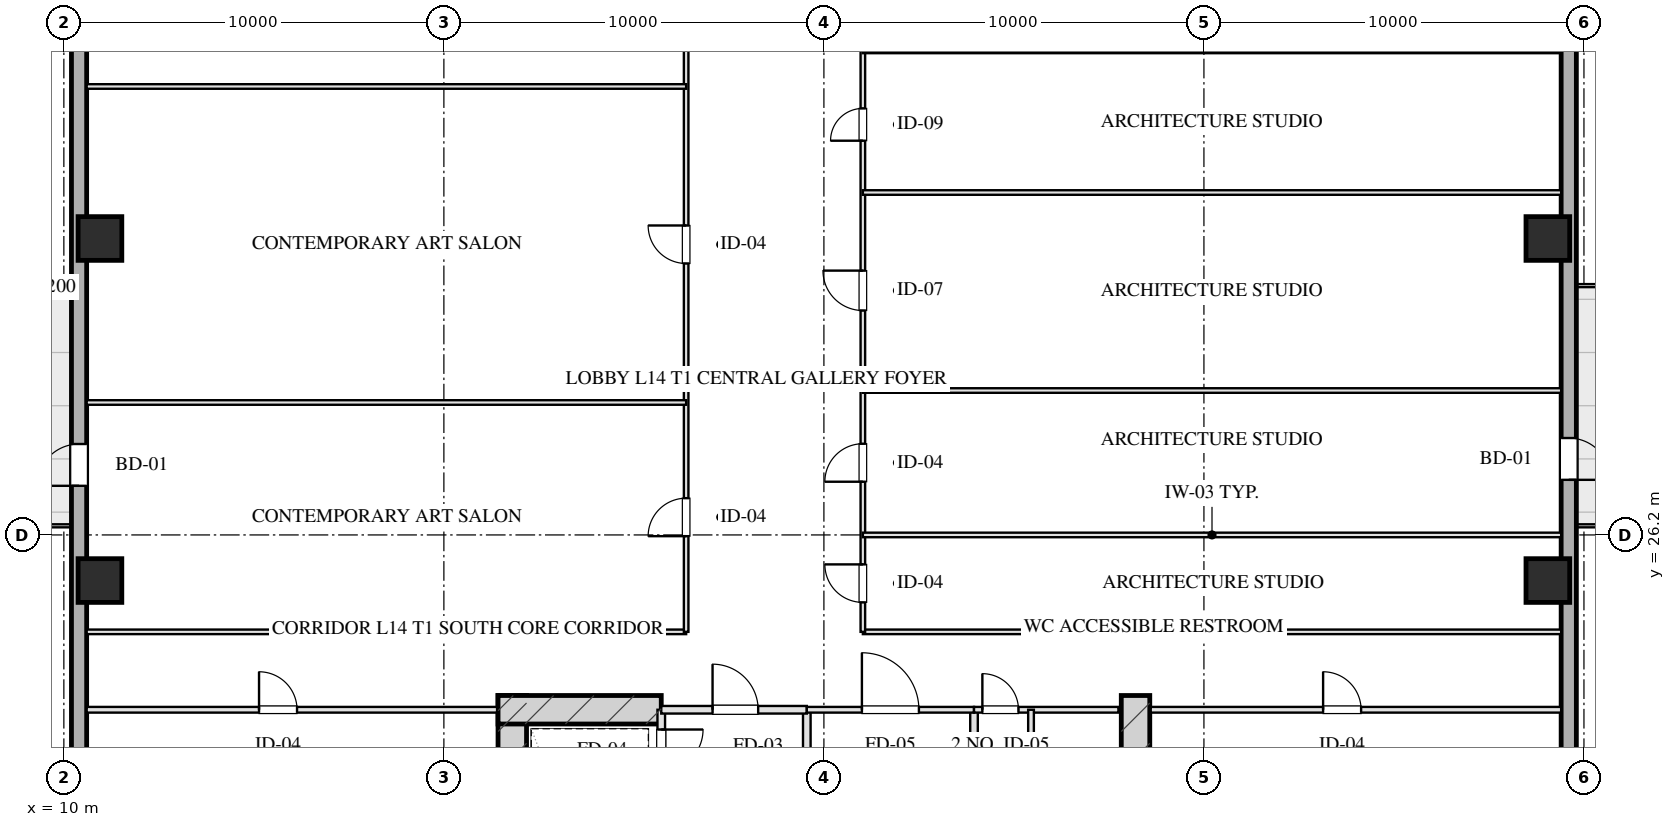
"""IFC4 building model, lengths in metres.
Left out: names, types, materials, properties, quantities, classifications, styles, units other than length and angle.
Written with IfcOpenShell. Run it as: python <this file> out.ifc"""

import sys

from ifc_helpers import new_model, si_unit, direction, frame, frame_2d, origin, origin_2d, place, context, subcontext, project, spatial, rectangle, hollow_rectangle, extrude, element, fill, save


model = new_model("IFC4")
c1 = context("Model", 3, precision=1e-05, world=origin(), true_north=direction((0.0, 1.0)))
c2 = subcontext(c1, "Body", "Model", "MODEL_VIEW")
j1 = project(units=[si_unit("LENGTHUNIT", "METRE"), si_unit("PLANEANGLEUNIT", "RADIAN")], contexts=[c1])
p1 = place(None, origin())
s1 = spatial("IfcSite", under=j1, at=p1, CompositionType="ELEMENT")
p2 = place(p1, origin())
s2 = spatial("IfcBuilding", under=s1, at=p2, CompositionType="ELEMENT")
p3 = place(p2, frame((0.0, 0.0, 60.95)))
s3 = spatial("IfcBuildingStorey", under=s2, at=p3, CompositionType="ELEMENT", Elevation=60.95)
for number, where, z_axis, x_axis in (
    (1, (21.8, 21.975, 0.0), (0.0, 0.0, 1.0), (0.0, -1.0, 0.0)),
    (2, (38.2, 21.975, 0.0), (0.0, 0.0, 1.0), (0.0, -1.0, 0.0)),
):
    element("IfcWall", number, at=place(p3, frame(where, z_axis=z_axis, x_axis=x_axis)), inside=s3, PredefinedType="SHEAR", context=c2, shape_type="SweptSolid", body=[
        extrude(rectangle(XDim=9.63, YDim=0.75, at=frame_2d((4.815, 0.0))), origin(), (0.0, 0.0, 1.0), 3.45),
    ])
p4 = place(p3, frame((21.425, 21.6, 0.0), z_axis=(0.0, 0.0, 1.0), x_axis=(1.0, 0.0, 0.0)))
e3 = element("IfcWall", 3, at=p4, inside=s3, PredefinedType="SHEAR", context=c2, shape_type="SweptSolid", body=[
    extrude(rectangle(XDim=4.295, YDim=0.75, at=frame_2d((2.147, 0.0))), origin(), (0.0, 0.0, 1.0), 3.45),
])
for number, where, z_axis, x_axis in (
    (4, (10.95, 25.0, 0.0), (0.0, 0.0, 1.0), (1.0, 0.0, 0.0)),
    (5, (10.95, 34.0, 0.0), (0.0, 0.0, 1.0), (1.0, 0.0, 0.0)),
    (6, (49.05, 25.0, 0.0), (0.0, 0.0, 1.0), (1.0, 0.0, 0.0)),
    (7, (49.05, 34.0, 0.0), (0.0, 0.0, 1.0), (1.0, 0.0, 0.0)),
):
    element("IfcColumn", number, at=place(p3, frame(where, z_axis=z_axis, x_axis=x_axis)), inside=s3, PredefinedType="COLUMN", context=c2, shape_type="SweptSolid", body=[
        extrude(hollow_rectangle(XDim=1.15, YDim=1.15, WallThickness=0.04, at=origin_2d()), origin(), (0.0, 0.0, 1.0), 3.451),
    ])
p5 = place(p3, frame((10.4, 7.2, 0.0), z_axis=(0.0, 0.0, 1.0), x_axis=(0.0, 1.0, 0.0)))
e8 = element("IfcWall", 8, at=p5, inside=s3, PredefinedType="SOLIDWALL", context=c2, shape_type="SweptSolid", body=[
    extrude(rectangle(XDim=53.6, YDim=0.4, at=frame_2d((26.8, 0.0))), origin(), (0.0, 0.0, 1.0), 2.61),
])
p6 = place(p5, frame((31.95, 0.0, 0.75)))
e9 = element("IfcOpeningElement", 9, at=p6, cuts=e8, PredefinedType="OPENING", context=c2, shape_type="SweptSolid", body=[
    extrude(rectangle(XDim=2.5, YDim=1.46, at=frame_2d((1.25, 0.73))), frame((0.0, 0.21, 0.0), z_axis=(0.0, -1.0, 0.0), x_axis=(1.0, 0.0, 0.0)), (0.0, 0.0, 1.0), 0.42),
])
p7 = place(p5, frame((20.292, 0.0, 0.0)))
e10 = element("IfcOpeningElement", 10, at=p7, cuts=e8, PredefinedType="OPENING", context=c2, shape_type="SweptSolid", body=[
    extrude(rectangle(XDim=1.1, YDim=2.15, at=frame_2d((0.55, 1.075))), frame((0.0, 0.21, 0.0), z_axis=(0.0, -1.0, 0.0), x_axis=(1.0, 0.0, 0.0)), (0.0, 0.0, 1.0), 0.42),
])
p8 = place(p3, frame((49.6, 60.8, 0.0), z_axis=(0.0, 0.0, 1.0), x_axis=(0.0, -1.0, 0.0)))
e11 = element("IfcWall", 11, at=p8, inside=s3, PredefinedType="SOLIDWALL", context=c2, shape_type="SweptSolid", body=[
    extrude(rectangle(XDim=53.6, YDim=0.4, at=frame_2d((26.8, 0.0))), origin(), (0.0, 0.0, 1.0), 2.61),
])
p9 = place(p8, frame((32.05, 0.0, 0.0)))
e12 = element("IfcOpeningElement", 12, at=p9, cuts=e11, PredefinedType="OPENING", context=c2, shape_type="SweptSolid", body=[
    extrude(rectangle(XDim=1.1, YDim=2.15, at=frame_2d((0.55, 1.075))), frame((0.0, 0.21, 0.0), z_axis=(0.0, -1.0, 0.0), x_axis=(1.0, 0.0, 0.0)), (0.0, 0.0, 1.0), 0.42),
])
p10 = place(p3, frame((25.72, 21.6, 0.0), z_axis=(0.0, 0.0, 1.0), x_axis=(0.0, -1.0, 0.0)))
e13 = element("IfcWall", 13, at=p10, inside=s3, PredefinedType="PARTITIONING", context=c2, shape_type="SweptSolid", body=[
    extrude(rectangle(XDim=1.9, YDim=0.2, at=frame_2d((0.95, 0.0))), origin(), (0.0, 0.0, 1.0), 3.175),
])
p11 = place(p10, frame((0.52, 0.0, 0.0)))
e14 = element("IfcOpeningElement", 14, at=p11, cuts=e13, PredefinedType="OPENING", context=c2, shape_type="SweptSolid", body=[
    extrude(rectangle(XDim=1.1, YDim=2.05, at=frame_2d((0.55, 1.025))), frame((0.0, 0.11, 0.0), z_axis=(0.0, -1.0, 0.0), x_axis=(1.0, 0.0, 0.0)), (0.0, 0.0, 1.0), 0.22),
])
p12 = place(p3, frame((29.55, 21.6, 0.0), z_axis=(0.0, 0.0, 1.0), x_axis=(0.0, -1.0, 0.0)))
e15 = element("IfcWall", 15, at=p12, inside=s3, PredefinedType="PARTITIONING", context=c2, shape_type="SweptSolid", body=[
    extrude(rectangle(XDim=8.43, YDim=0.2, at=frame_2d((4.215, 0.0))), origin(), (0.0, 0.0, 1.0), 3.175),
])
p13 = place(p3, frame((25.72, 21.6, 0.0), z_axis=(0.0, 0.0, 1.0), x_axis=(1.0, 0.0, 0.0)))
e16 = element("IfcWall", 16, at=p13, inside=s3, PredefinedType="PARTITIONING", context=c2, shape_type="SweptSolid", body=[
    extrude(rectangle(XDim=3.83, YDim=0.2, at=frame_2d((1.915, 0.0))), origin(), (0.0, 0.0, 1.0), 3.175),
])
p14 = place(p13, frame((1.35, 0.0, 0.0)))
e17 = element("IfcOpeningElement", 17, at=p14, cuts=e16, PredefinedType="OPENING", context=c2, shape_type="SweptSolid", body=[
    extrude(rectangle(XDim=1.2, YDim=2.05, at=frame_2d((0.6, 1.025))), frame((0.0, 0.11, 0.0), z_axis=(0.0, -1.0, 0.0), x_axis=(1.0, 0.0, 0.0)), (0.0, 0.0, 1.0), 0.22),
])
p15 = place(p3, frame((33.95, 21.6, 0.0), z_axis=(0.0, 0.0, 1.0), x_axis=(0.0, -1.0, 0.0)))
e18 = element("IfcWall", 18, at=p15, inside=s3, PredefinedType="PARTITIONING", context=c2, shape_type="SweptSolid", body=[
    extrude(rectangle(XDim=8.43, YDim=0.2, at=frame_2d((4.215, 0.0))), origin(), (0.0, 0.0, 1.0), 3.175),
])
p16 = place(p3, frame((29.55, 21.6, 0.0), z_axis=(0.0, 0.0, 1.0), x_axis=(1.0, 0.0, 0.0)))
e19 = element("IfcWall", 19, at=p16, inside=s3, PredefinedType="PARTITIONING", context=c2, shape_type="SweptSolid", body=[
    extrude(rectangle(XDim=4.4, YDim=0.15, at=frame_2d((2.2, 0.0))), origin(), (0.0, 0.0, 1.0), 3.175),
])
p17 = place(p16, frame((1.45, 0.0, 0.0)))
e20 = element("IfcOpeningElement", 20, at=p17, cuts=e19, PredefinedType="OPENING", context=c2, shape_type="SweptSolid", body=[
    extrude(rectangle(XDim=1.5, YDim=2.05, at=frame_2d((0.75, 1.025))), frame((0.0, 0.085, 0.0), z_axis=(0.0, -1.0, 0.0), x_axis=(1.0, 0.0, 0.0)), (0.0, 0.0, 1.0), 0.17),
])
p18 = place(p3, frame((33.95, 21.6, 0.0), z_axis=(0.0, 0.0, 1.0), x_axis=(1.0, 0.0, 0.0)))
e21 = element("IfcWall", 21, at=p18, inside=s3, PredefinedType="PARTITIONING", context=c2, shape_type="SweptSolid", body=[
    extrude(rectangle(XDim=3.8, YDim=0.15, at=frame_2d((1.9, 0.0))), origin(), (0.0, 0.0, 1.0), 3.175),
])
p19 = place(p18, frame((0.22, 0.0, 0.0)))
e22 = element("IfcOpeningElement", 22, at=p19, cuts=e21, PredefinedType="OPENING", context=c2, shape_type="SweptSolid", body=[
    extrude(rectangle(XDim=0.95, YDim=2.05, at=frame_2d((0.475, 1.025))), frame((0.0, 0.085, 0.0), z_axis=(0.0, -1.0, 0.0), x_axis=(1.0, 0.0, 0.0)), (0.0, 0.0, 1.0), 0.17),
])
p20 = place(p3, frame((35.45, 21.6, 0.0), z_axis=(0.0, 0.0, 1.0), x_axis=(0.0, -1.0, 0.0)))
e23 = element("IfcWall", 23, at=p20, inside=s3, PredefinedType="PARTITIONING", context=c2, shape_type="SweptSolid", body=[
    extrude(rectangle(XDim=8.43, YDim=0.15, at=frame_2d((4.215, 0.0))), origin(), (0.0, 0.0, 1.0), 2.765),
])
p21 = place(p20, frame((2.55, 0.0, 0.0)))
e24 = element("IfcOpeningElement", 24, at=p21, cuts=e23, PredefinedType="OPENING", context=c2, shape_type="SweptSolid", body=[
    extrude(rectangle(XDim=0.95, YDim=2.05, at=frame_2d((0.475, 1.025))), frame((0.0, 0.085, 0.0), z_axis=(0.0, -1.0, 0.0), x_axis=(1.0, 0.0, 0.0)), (0.0, 0.0, 1.0), 0.17),
])
p22 = place(p20, frame((5.8, 0.0, 0.0)))
e25 = element("IfcOpeningElement", 25, at=p22, cuts=e23, PredefinedType="OPENING", context=c2, shape_type="SweptSolid", body=[
    extrude(rectangle(XDim=0.9, YDim=2.05, at=frame_2d((0.45, 1.025))), frame((0.0, 0.085, 0.0), z_axis=(0.0, -1.0, 0.0), x_axis=(1.0, 0.0, 0.0)), (0.0, 0.0, 1.0), 0.17),
])
p23 = place(p3, frame((10.6, 21.6, 0.0), z_axis=(0.0, 0.0, 1.0), x_axis=(1.0, 0.0, 0.0)))
e26 = element("IfcWall", 26, at=p23, inside=s3, PredefinedType="PARTITIONING", context=c2, shape_type="SweptSolid", body=[
    extrude(rectangle(XDim=10.8, YDim=0.15, at=frame_2d((5.4, 0.0))), origin(), (0.0, 0.0, 1.0), 3.175),
])
p24 = place(p23, frame((4.536, 0.0, 0.0)))
e27 = element("IfcOpeningElement", 27, at=p24, cuts=e26, PredefinedType="OPENING", context=c2, shape_type="SweptSolid", body=[
    extrude(rectangle(XDim=1.0, YDim=2.05, at=frame_2d((0.5, 1.025))), frame((0.0, 0.085, 0.0), z_axis=(0.0, -1.0, 0.0), x_axis=(1.0, 0.0, 0.0)), (0.0, 0.0, 1.0), 0.17),
])
p25 = place(p3, frame((38.6, 21.6, 0.0), z_axis=(0.0, 0.0, 1.0), x_axis=(1.0, 0.0, 0.0)))
e28 = element("IfcWall", 28, at=p25, inside=s3, PredefinedType="PARTITIONING", context=c2, shape_type="SweptSolid", body=[
    extrude(rectangle(XDim=10.8, YDim=0.15, at=frame_2d((5.4, 0.0))), origin(), (0.0, 0.0, 1.0), 3.175),
])
p26 = place(p25, frame((4.536, 0.0, 0.0)))
e29 = element("IfcOpeningElement", 29, at=p26, cuts=e28, PredefinedType="OPENING", context=c2, shape_type="SweptSolid", body=[
    extrude(rectangle(XDim=1.0, YDim=2.05, at=frame_2d((0.5, 1.025))), frame((0.0, 0.085, 0.0), z_axis=(0.0, -1.0, 0.0), x_axis=(1.0, 0.0, 0.0)), (0.0, 0.0, 1.0), 0.17),
])
p27 = place(p3, frame((10.6, 23.65, 0.0), z_axis=(0.0, 0.0, 1.0), x_axis=(1.0, 0.0, 0.0)))
e30 = element("IfcWall", 30, at=p27, inside=s3, PredefinedType="PARTITIONING", context=c2, shape_type="SweptSolid", body=[
    extrude(rectangle(XDim=15.775, YDim=0.12, at=frame_2d((7.887, 0.0))), origin(), (0.0, 0.0, 1.0), 3.175),
])
p28 = place(p3, frame((31.025, 23.65, 0.0), z_axis=(0.0, 0.0, 1.0), x_axis=(1.0, 0.0, 0.0)))
e31 = element("IfcWall", 31, at=p28, inside=s3, PredefinedType="PARTITIONING", context=c2, shape_type="SweptSolid", body=[
    extrude(rectangle(XDim=18.375, YDim=0.12, at=frame_2d((9.188, 0.0))), origin(), (0.0, 0.0, 1.0), 3.175),
])
p29 = place(p3, frame((26.375, 23.65, 0.0), z_axis=(0.0, 0.0, 1.0), x_axis=(0.0, 1.0, 0.0)))
e32 = element("IfcWall", 32, at=p29, inside=s3, PredefinedType="PARTITIONING", context=c2, shape_type="SweptSolid", body=[
    extrude(rectangle(XDim=20.7, YDim=0.12, at=frame_2d((10.35, 0.0))), origin(), (0.0, 0.0, 1.0), 3.175),
])
p30 = place(p29, frame((2.518, 0.0, 0.0)))
e33 = element("IfcOpeningElement", 33, at=p30, cuts=e32, PredefinedType="OPENING", context=c2, shape_type="SweptSolid", body=[
    extrude(rectangle(XDim=1.0, YDim=2.05, at=frame_2d((0.5, 1.025))), frame((0.0, 0.07, 0.0), z_axis=(0.0, -1.0, 0.0), x_axis=(1.0, 0.0, 0.0)), (0.0, 0.0, 1.0), 0.14),
])
p31 = place(p29, frame((9.692, 0.0, 0.0)))
e34 = element("IfcOpeningElement", 34, at=p31, cuts=e32, PredefinedType="OPENING", context=c2, shape_type="SweptSolid", body=[
    extrude(rectangle(XDim=1.0, YDim=2.05, at=frame_2d((0.5, 1.025))), frame((0.0, 0.07, 0.0), z_axis=(0.0, -1.0, 0.0), x_axis=(1.0, 0.0, 0.0)), (0.0, 0.0, 1.0), 0.14),
])
p32 = place(p29, frame((17.025, 0.0, 0.0)))
e35 = element("IfcOpeningElement", 35, at=p32, cuts=e32, PredefinedType="OPENING", context=c2, shape_type="SweptSolid", body=[
    extrude(rectangle(XDim=1.0, YDim=2.05, at=frame_2d((0.5, 1.025))), frame((0.0, 0.07, 0.0), z_axis=(0.0, -1.0, 0.0), x_axis=(1.0, 0.0, 0.0)), (0.0, 0.0, 1.0), 0.14),
])
p33 = place(p3, frame((31.025, 23.65, 0.0), z_axis=(0.0, 0.0, 1.0), x_axis=(0.0, 1.0, 0.0)))
e36 = element("IfcWall", 36, at=p33, inside=s3, PredefinedType="PARTITIONING", context=c2, shape_type="SweptSolid", body=[
    extrude(rectangle(XDim=20.7, YDim=0.12, at=frame_2d((10.35, 0.0))), origin(), (0.0, 0.0, 1.0), 3.175),
])
p34 = place(p33, frame((0.775, 0.0, 0.0)))
e37 = element("IfcOpeningElement", 37, at=p34, cuts=e36, PredefinedType="OPENING", context=c2, shape_type="SweptSolid", body=[
    extrude(rectangle(XDim=1.0, YDim=2.05, at=frame_2d((0.5, 1.025))), frame((0.0, 0.07, 0.0), z_axis=(0.0, -1.0, 0.0), x_axis=(1.0, 0.0, 0.0)), (0.0, 0.0, 1.0), 0.14),
])
p35 = place(p33, frame((3.95, 0.0, 0.0)))
e38 = element("IfcOpeningElement", 38, at=p35, cuts=e36, PredefinedType="OPENING", context=c2, shape_type="SweptSolid", body=[
    extrude(rectangle(XDim=1.0, YDim=2.05, at=frame_2d((0.5, 1.025))), frame((0.0, 0.07, 0.0), z_axis=(0.0, -1.0, 0.0), x_axis=(1.0, 0.0, 0.0)), (0.0, 0.0, 1.0), 0.14),
])
p36 = place(p33, frame((8.455, 0.0, 0.0)))
e39 = element("IfcOpeningElement", 39, at=p36, cuts=e36, PredefinedType="OPENING", context=c2, shape_type="SweptSolid", body=[
    extrude(rectangle(XDim=1.05, YDim=2.05, at=frame_2d((0.525, 1.025))), frame((0.0, 0.07, 0.0), z_axis=(0.0, -1.0, 0.0), x_axis=(1.0, 0.0, 0.0)), (0.0, 0.0, 1.0), 0.14),
])
p37 = place(p33, frame((12.923, 0.0, 0.0)))
e40 = element("IfcOpeningElement", 40, at=p37, cuts=e36, PredefinedType="OPENING", context=c2, shape_type="SweptSolid", body=[
    extrude(rectangle(XDim=0.85, YDim=2.05, at=frame_2d((0.425, 1.025))), frame((0.0, 0.07, 0.0), z_axis=(0.0, -1.0, 0.0), x_axis=(1.0, 0.0, 0.0)), (0.0, 0.0, 1.0), 0.14),
])
p38 = place(p33, frame((16.338, 0.0, 0.0)))
e41 = element("IfcOpeningElement", 41, at=p38, cuts=e36, PredefinedType="OPENING", context=c2, shape_type="SweptSolid", body=[
    extrude(rectangle(XDim=1.0, YDim=2.05, at=frame_2d((0.5, 1.025))), frame((0.0, 0.07, 0.0), z_axis=(0.0, -1.0, 0.0), x_axis=(1.0, 0.0, 0.0)), (0.0, 0.0, 1.0), 0.14),
])
p39 = place(p33, frame((19.045, 0.0, 0.0)))
e42 = element("IfcOpeningElement", 42, at=p39, cuts=e36, PredefinedType="OPENING", context=c2, shape_type="SweptSolid", body=[
    extrude(rectangle(XDim=1.0, YDim=2.05, at=frame_2d((0.5, 1.025))), frame((0.0, 0.07, 0.0), z_axis=(0.0, -1.0, 0.0), x_axis=(1.0, 0.0, 0.0)), (0.0, 0.0, 1.0), 0.14),
])
for number, where, z_axis, x_axis in (
    (43, (10.6, 29.685, 0.0), (0.0, 0.0, 1.0), (1.0, 0.0, 0.0)),
    (44, (10.6, 38.0, 0.0), (0.0, 0.0, 1.0), (1.0, 0.0, 0.0)),
):
    element("IfcWall", number, at=place(p3, frame(where, z_axis=z_axis, x_axis=x_axis)), inside=s3, PredefinedType="PARTITIONING", context=c2, shape_type="SweptSolid", body=[
        extrude(rectangle(XDim=15.775, YDim=0.12, at=frame_2d((7.887, 0.0))), origin(), (0.0, 0.0, 1.0), 3.175),
    ])
for number, where, z_axis, x_axis in (
    (45, (31.025, 26.2, 0.0), (0.0, 0.0, 1.0), (1.0, 0.0, 0.0)),
    (46, (31.025, 30.0, 0.0), (0.0, 0.0, 1.0), (1.0, 0.0, 0.0)),
    (47, (31.025, 35.21, 0.0), (0.0, 0.0, 1.0), (1.0, 0.0, 0.0)),
    (48, (31.025, 38.936, 0.0), (0.0, 0.0, 1.0), (1.0, 0.0, 0.0)),
):
    element("IfcWall", number, at=place(p3, frame(where, z_axis=z_axis, x_axis=x_axis)), inside=s3, PredefinedType="PARTITIONING", context=c2, shape_type="SweptSolid", body=[
        extrude(rectangle(XDim=18.375, YDim=0.12, at=frame_2d((9.188, 0.0))), origin(), (0.0, 0.0, 1.0), 3.175),
    ])
p40 = place(p7, origin())
e49 = element("IfcDoor", 49, at=p40, inside=s3, OperationType="SINGLE_SWING_LEFT", PredefinedType="DOOR", context=c2, shape_type="SweptSolid", body=[
    extrude(rectangle(XDim=1.1, YDim=2.15, at=frame_2d((0.55, 1.075))), frame((0.0, 0.025, 0.0), z_axis=(0.0, -1.0, 0.0), x_axis=(1.0, 0.0, 0.0)), (0.0, 0.0, 1.0), 0.05),
])
fill(e10, e49)
p41 = place(p9, origin())
e50 = element("IfcDoor", 50, at=p41, inside=s3, OperationType="SINGLE_SWING_RIGHT", PredefinedType="DOOR", context=c2, shape_type="SweptSolid", body=[
    extrude(rectangle(XDim=1.1, YDim=2.15, at=frame_2d((0.55, 1.075))), frame((0.0, 0.025, 0.0), z_axis=(0.0, -1.0, 0.0), x_axis=(1.0, 0.0, 0.0)), (0.0, 0.0, 1.0), 0.05),
])
fill(e12, e50)
p42 = place(p11, origin())
e51 = element("IfcDoor", 51, at=p42, inside=s3, OperationType="SINGLE_SWING_LEFT", PredefinedType="DOOR", context=c2, shape_type="SweptSolid", body=[
    extrude(rectangle(XDim=1.1, YDim=2.05, at=frame_2d((0.55, 1.025))), frame((0.0, 0.025, 0.0), z_axis=(0.0, -1.0, 0.0), x_axis=(1.0, 0.0, 0.0)), (0.0, 0.0, 1.0), 0.05),
])
fill(e14, e51)
p43 = place(p14, origin())
e52 = element("IfcDoor", 52, at=p43, inside=s3, OperationType="SINGLE_SWING_LEFT", PredefinedType="DOOR", context=c2, shape_type="SweptSolid", body=[
    extrude(rectangle(XDim=1.2, YDim=2.05, at=frame_2d((0.6, 1.025))), frame((0.0, 0.025, 0.0), z_axis=(0.0, -1.0, 0.0), x_axis=(1.0, 0.0, 0.0)), (0.0, 0.0, 1.0), 0.05),
])
fill(e17, e52)
p44 = place(p17, origin())
e53 = element("IfcDoor", 53, at=p44, inside=s3, OperationType="SINGLE_SWING_LEFT", PredefinedType="DOOR", context=c2, shape_type="SweptSolid", body=[
    extrude(rectangle(XDim=1.5, YDim=2.05, at=frame_2d((0.75, 1.025))), frame((0.0, 0.025, 0.0), z_axis=(0.0, -1.0, 0.0), x_axis=(1.0, 0.0, 0.0)), (0.0, 0.0, 1.0), 0.05),
])
fill(e20, e53)
p45 = place(p19, origin())
e54 = element("IfcDoor", 54, at=p45, inside=s3, OperationType="SINGLE_SWING_LEFT", PredefinedType="DOOR", context=c2, shape_type="SweptSolid", body=[
    extrude(rectangle(XDim=0.95, YDim=2.05, at=frame_2d((0.475, 1.025))), frame((0.0, 0.025, 0.0), z_axis=(0.0, -1.0, 0.0), x_axis=(1.0, 0.0, 0.0)), (0.0, 0.0, 1.0), 0.05),
])
fill(e22, e54)
p46 = place(p24, origin())
e55 = element("IfcDoor", 55, at=p46, inside=s3, OperationType="SINGLE_SWING_LEFT", PredefinedType="DOOR", context=c2, shape_type="SweptSolid", body=[
    extrude(rectangle(XDim=1.0, YDim=2.05, at=frame_2d((0.5, 1.025))), frame((0.0, 0.025, 0.0), z_axis=(0.0, -1.0, 0.0), x_axis=(1.0, 0.0, 0.0)), (0.0, 0.0, 1.0), 0.05),
])
fill(e27, e55)
p47 = place(p26, origin())
e56 = element("IfcDoor", 56, at=p47, inside=s3, OperationType="SINGLE_SWING_LEFT", PredefinedType="DOOR", context=c2, shape_type="SweptSolid", body=[
    extrude(rectangle(XDim=1.0, YDim=2.05, at=frame_2d((0.5, 1.025))), frame((0.0, 0.025, 0.0), z_axis=(0.0, -1.0, 0.0), x_axis=(1.0, 0.0, 0.0)), (0.0, 0.0, 1.0), 0.05),
])
fill(e29, e56)
p48 = place(p30, origin())
e57 = element("IfcDoor", 57, at=p48, inside=s3, OperationType="SINGLE_SWING_LEFT", PredefinedType="DOOR", context=c2, shape_type="SweptSolid", body=[
    extrude(rectangle(XDim=1.0, YDim=2.05, at=frame_2d((0.5, 1.025))), frame((0.0, 0.025, 0.0), z_axis=(0.0, -1.0, 0.0), x_axis=(1.0, 0.0, 0.0)), (0.0, 0.0, 1.0), 0.05),
])
fill(e33, e57)
p49 = place(p31, origin())
e58 = element("IfcDoor", 58, at=p49, inside=s3, OperationType="SINGLE_SWING_RIGHT", PredefinedType="DOOR", context=c2, shape_type="SweptSolid", body=[
    extrude(rectangle(XDim=1.0, YDim=2.05, at=frame_2d((0.5, 1.025))), frame((0.0, 0.025, 0.0), z_axis=(0.0, -1.0, 0.0), x_axis=(1.0, 0.0, 0.0)), (0.0, 0.0, 1.0), 0.05),
])
fill(e34, e58)
p50 = place(p34, origin())
e59 = element("IfcDoor", 59, at=p50, inside=s3, OperationType="SINGLE_SWING_RIGHT", PredefinedType="DOOR", context=c2, shape_type="SweptSolid", body=[
    extrude(rectangle(XDim=1.0, YDim=2.05, at=frame_2d((0.5, 1.025))), frame((0.0, 0.025, 0.0), z_axis=(0.0, -1.0, 0.0), x_axis=(1.0, 0.0, 0.0)), (0.0, 0.0, 1.0), 0.05),
])
fill(e37, e59)
p51 = place(p35, origin())
e60 = element("IfcDoor", 60, at=p51, inside=s3, OperationType="SINGLE_SWING_LEFT", PredefinedType="DOOR", context=c2, shape_type="SweptSolid", body=[
    extrude(rectangle(XDim=1.0, YDim=2.05, at=frame_2d((0.5, 1.025))), frame((0.0, 0.025, 0.0), z_axis=(0.0, -1.0, 0.0), x_axis=(1.0, 0.0, 0.0)), (0.0, 0.0, 1.0), 0.05),
])
fill(e38, e60)
p52 = place(p36, origin())
e61 = element("IfcDoor", 61, at=p52, inside=s3, OperationType="SINGLE_SWING_RIGHT", PredefinedType="DOOR", context=c2, shape_type="SweptSolid", body=[
    extrude(rectangle(XDim=1.05, YDim=2.05, at=frame_2d((0.525, 1.025))), frame((0.0, 0.025, 0.0), z_axis=(0.0, -1.0, 0.0), x_axis=(1.0, 0.0, 0.0)), (0.0, 0.0, 1.0), 0.05),
])
fill(e39, e61)
p53 = place(p37, origin())
e62 = element("IfcDoor", 62, at=p53, inside=s3, OperationType="SINGLE_SWING_LEFT", PredefinedType="DOOR", context=c2, shape_type="SweptSolid", body=[
    extrude(rectangle(XDim=0.85, YDim=2.05, at=frame_2d((0.425, 1.025))), frame((0.0, 0.025, 0.0), z_axis=(0.0, -1.0, 0.0), x_axis=(1.0, 0.0, 0.0)), (0.0, 0.0, 1.0), 0.05),
])
fill(e40, e62)
save(model, sys.argv[1])
